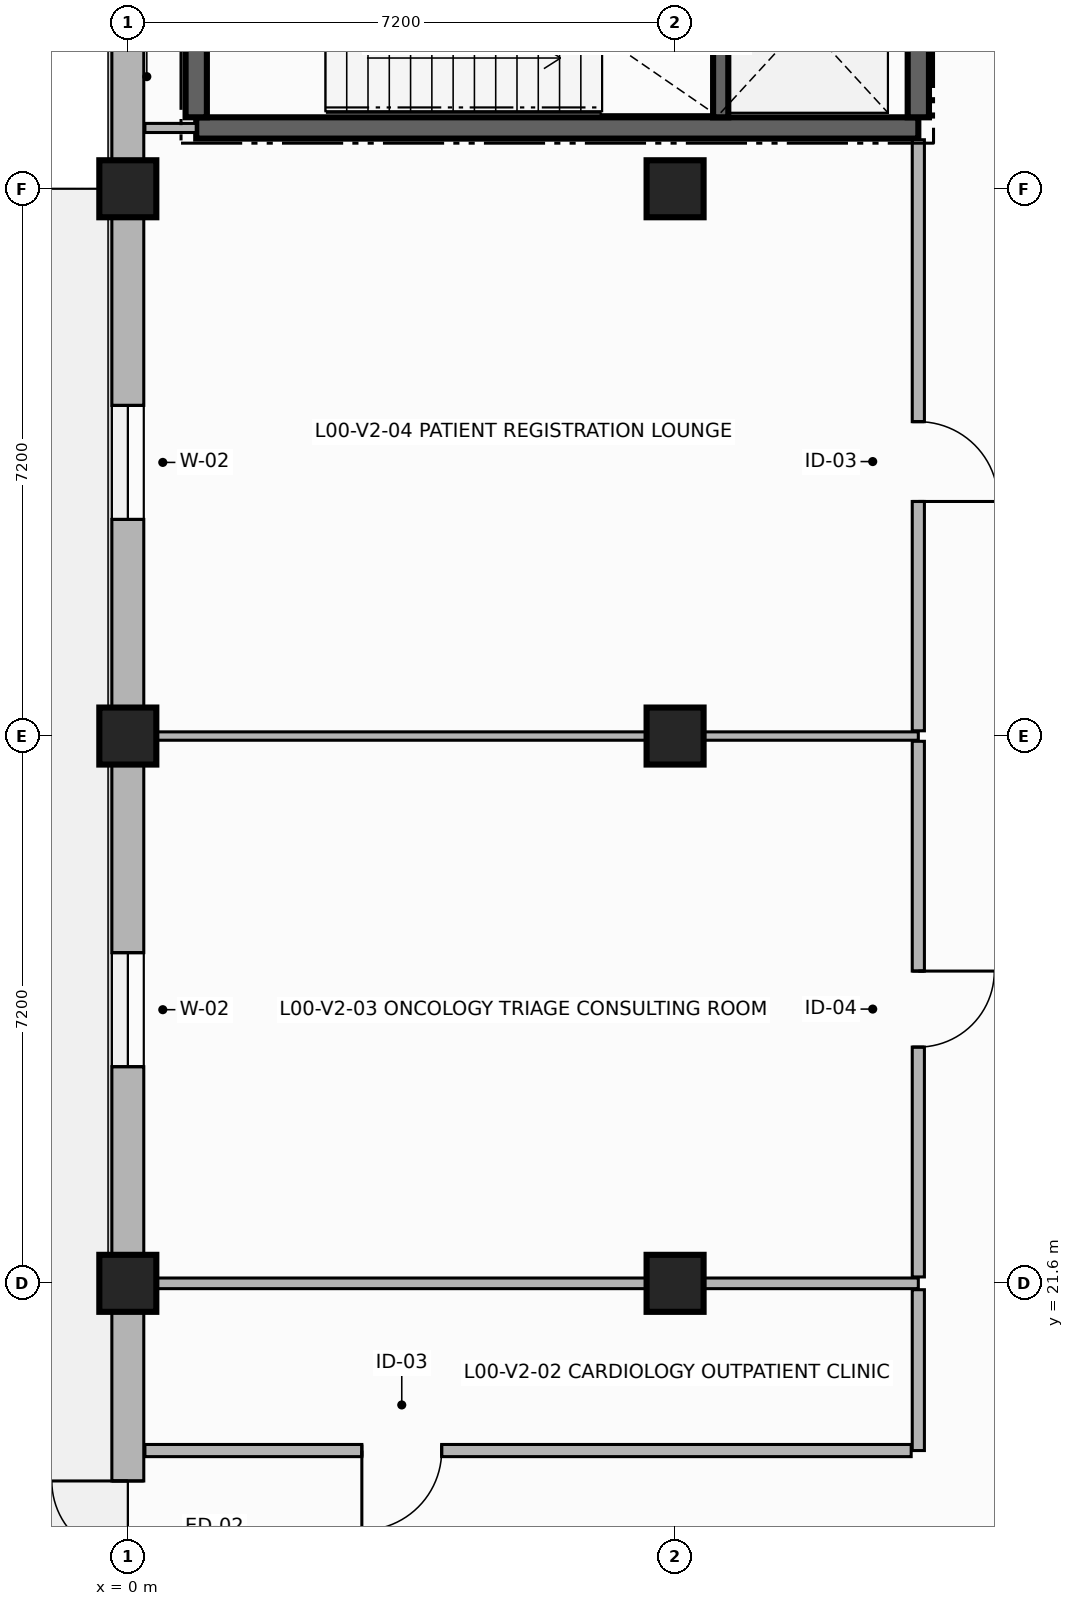
"""IFC4 building model, lengths in metres.
Left out: names, types, materials, properties, quantities, classifications, styles, units other than length and angle.
Written with IfcOpenShell. Run it as: python <this file> out.ifc"""

import sys

from ifc_helpers import new_model, si_unit, direction, frame, frame_2d, origin, origin_2d, place, context, subcontext, project, spatial, rectangle, extrude, element, fill, save


model = new_model("IFC4")
c1 = context("Model", 3, precision=1e-05, world=origin(), true_north=direction((0.0, 1.0)))
c2 = subcontext(c1, "Body", "Model", "MODEL_VIEW")
j1 = project(units=[si_unit("LENGTHUNIT", "METRE"), si_unit("PLANEANGLEUNIT", "RADIAN")], contexts=[c1])
p1 = place(None, origin())
s1 = spatial("IfcSite", under=j1, at=p1, CompositionType="ELEMENT")
p2 = place(p1, origin())
s2 = spatial("IfcBuilding", under=s1, at=p2, CompositionType="ELEMENT")
p3 = place(p2, origin())
s3 = spatial("IfcBuildingStorey", under=s2, at=p3, CompositionType="ELEMENT", Elevation=0.0)
for number, where, z_axis, x_axis in (
    (1, (0.0, 21.6, 0.0), (0.0, 0.0, 1.0), (1.0, 0.0, 0.0)),
    (2, (0.0, 28.8, 0.0), (0.0, 0.0, 1.0), (1.0, 0.0, 0.0)),
    (3, (0.0, 36.0, 0.0), (0.0, 0.0, 1.0), (1.0, 0.0, 0.0)),
    (4, (7.2, 21.6, 0.0), (0.0, 0.0, 1.0), (1.0, 0.0, 0.0)),
    (5, (7.2, 28.8, 0.0), (0.0, 0.0, 1.0), (1.0, 0.0, 0.0)),
    (6, (7.2, 36.0, 0.0), (0.0, 0.0, 1.0), (1.0, 0.0, 0.0)),
):
    element("IfcColumn", number, at=place(p3, frame(where, z_axis=z_axis, x_axis=x_axis)), inside=s3, PredefinedType="COLUMN", context=c2, shape_type="SweptSolid", body=[
        extrude(rectangle(XDim=0.75, YDim=0.75, at=origin_2d()), origin(), (0.0, 0.0, 1.0), 4.22),
    ])
p4 = place(p3, frame((0.0, 43.2, 0.0), z_axis=(0.0, 0.0, 1.0), x_axis=(0.0, -1.0, 0.0)))
e7 = element("IfcWall", 7, at=p4, inside=s3, PredefinedType="SOLIDWALL", context=c2, shape_type="SweptSolid", body=[
    extrude(rectangle(XDim=7.2, YDim=0.42, at=frame_2d((3.6, 0.0))), origin(), (0.0, 0.0, 1.0), 3.6),
])
p5 = place(p4, frame((2.75, 0.0, 0.85)))
e8 = element("IfcOpeningElement", 8, at=p5, cuts=e7, PredefinedType="OPENING", context=c2, shape_type="SweptSolid", body=[
    extrude(rectangle(XDim=1.5, YDim=2.5, at=frame_2d((0.75, 1.25))), frame((0.0, 0.22, 0.0), z_axis=(0.0, -1.0, 0.0), x_axis=(1.0, 0.0, 0.0)), (0.0, 0.0, 1.0), 0.44),
])
p6 = place(p3, frame((0.0, 36.0, 0.0), z_axis=(0.0, 0.0, 1.0), x_axis=(0.0, -1.0, 0.0)))
e9 = element("IfcWall", 9, at=p6, inside=s3, PredefinedType="SOLIDWALL", context=c2, shape_type="SweptSolid", body=[
    extrude(rectangle(XDim=7.2, YDim=0.42, at=frame_2d((3.6, 0.0))), origin(), (0.0, 0.0, 1.0), 3.6),
])
p7 = place(p6, frame((2.85, 0.0, 0.85)))
e10 = element("IfcOpeningElement", 10, at=p7, cuts=e9, PredefinedType="OPENING", context=c2, shape_type="SweptSolid", body=[
    extrude(rectangle(XDim=1.5, YDim=2.5, at=frame_2d((0.75, 1.25))), frame((0.0, 0.22, 0.0), z_axis=(0.0, -1.0, 0.0), x_axis=(1.0, 0.0, 0.0)), (0.0, 0.0, 1.0), 0.44),
])
p8 = place(p3, frame((0.0, 28.8, 0.0), z_axis=(0.0, 0.0, 1.0), x_axis=(0.0, -1.0, 0.0)))
e11 = element("IfcWall", 11, at=p8, inside=s3, PredefinedType="SOLIDWALL", context=c2, shape_type="SweptSolid", body=[
    extrude(rectangle(XDim=7.2, YDim=0.42, at=frame_2d((3.6, 0.0))), origin(), (0.0, 0.0, 1.0), 3.6),
])
p9 = place(p8, frame((2.85, 0.0, 0.85)))
e12 = element("IfcOpeningElement", 12, at=p9, cuts=e11, PredefinedType="OPENING", context=c2, shape_type="SweptSolid", body=[
    extrude(rectangle(XDim=1.5, YDim=2.5, at=frame_2d((0.75, 1.25))), frame((0.0, 0.22, 0.0), z_axis=(0.0, -1.0, 0.0), x_axis=(1.0, 0.0, 0.0)), (0.0, 0.0, 1.0), 0.44),
])
p10 = place(p3, frame((0.0, 21.6, 0.0), z_axis=(0.0, 0.0, 1.0), x_axis=(0.0, -1.0, 0.0)))
e13 = element("IfcWall", 13, at=p10, inside=s3, PredefinedType="SOLIDWALL", context=c2, shape_type="SweptSolid", body=[
    extrude(rectangle(XDim=7.2, YDim=0.42, at=frame_2d((3.6, 0.0))), origin(), (0.0, 0.0, 1.0), 3.6),
])
p11 = place(p10, frame((2.6, 0.0, 0.0)))
e14 = element("IfcOpeningElement", 14, at=p11, cuts=e13, PredefinedType="OPENING", context=c2, shape_type="SweptSolid", body=[
    extrude(rectangle(XDim=2.0, YDim=2.5, at=frame_2d((1.0, 1.25))), frame((0.0, 0.22, 0.0), z_axis=(0.0, -1.0, 0.0), x_axis=(1.0, 0.0, 0.0)), (0.0, 0.0, 1.0), 0.44),
])
p12 = place(p3, frame((0.9, 36.8, 0.0), z_axis=(0.0, 0.0, 1.0), x_axis=(1.0, 0.0, 0.0)))
e15 = element("IfcWall", 15, at=p12, inside=s3, PredefinedType="SHEAR", context=c2, shape_type="SweptSolid", body=[
    extrude(rectangle(XDim=9.5, YDim=0.28, at=frame_2d((4.75, 0.0))), origin(), (0.0, 0.0, 1.0), 4.22),
])
p13 = place(p3, frame((10.4, 36.94, 0.0), z_axis=(0.0, 0.0, 1.0), x_axis=(0.0, 1.0, 0.0)))
e16 = element("IfcWall", 16, at=p13, inside=s3, PredefinedType="SHEAR", context=c2, shape_type="SweptSolid", body=[
    extrude(rectangle(XDim=5.52, YDim=0.28, at=frame_2d((2.76, 0.0))), origin(), (0.0, 0.0, 1.0), 4.22),
])
p14 = place(p13, frame((4.0, 0.0, 0.0)))
e17 = element("IfcOpeningElement", 17, at=p14, cuts=e16, PredefinedType="OPENING", context=c2, shape_type="SweptSolid", body=[
    extrude(rectangle(XDim=1.2, YDim=2.25, at=frame_2d((0.6, 1.125))), frame((0.0, 0.15, 0.0), z_axis=(0.0, -1.0, 0.0), x_axis=(1.0, 0.0, 0.0)), (0.0, 0.0, 1.0), 0.3),
])
p15 = place(p3, frame((0.9, 42.46, 0.0), z_axis=(0.0, 0.0, 1.0), x_axis=(0.0, -1.0, 0.0)))
e18 = element("IfcWall", 18, at=p15, inside=s3, PredefinedType="SHEAR", context=c2, shape_type="SweptSolid", body=[
    extrude(rectangle(XDim=5.52, YDim=0.28, at=frame_2d((2.76, 0.0))), origin(), (0.0, 0.0, 1.0), 4.22),
])
p16 = place(p3, frame((7.8, 36.94, 0.0), z_axis=(0.0, 0.0, 1.0), x_axis=(0.0, 1.0, 0.0)))
e19 = element("IfcWall", 19, at=p16, inside=s3, PredefinedType="SHEAR", context=c2, shape_type="SweptSolid", body=[
    extrude(rectangle(XDim=3.66, YDim=0.2, at=frame_2d((1.83, 0.0))), origin(), (0.0, 0.0, 1.0), 4.22),
])
p17 = place(p3, frame((0.225, 21.6, 0.0), z_axis=(0.0, 0.0, 1.0), x_axis=(1.0, 0.0, 0.0)))
e20 = element("IfcWall", 20, at=p17, inside=s3, PredefinedType="PARTITIONING", context=c2, shape_type="SweptSolid", body=[
    extrude(rectangle(XDim=10.175, YDim=0.14, at=frame_2d((5.087, 0.0))), origin(), (0.0, 0.0, 1.0), 3.58),
])
p18 = place(p3, frame((10.4, 21.516, 0.0), z_axis=(0.0, 0.0, 1.0), x_axis=(0.0, -1.0, 0.0)))
e21 = element("IfcWall", 21, at=p18, inside=s3, PredefinedType="PARTITIONING", context=c2, shape_type="SweptSolid", body=[
    extrude(rectangle(XDim=2.116, YDim=0.16, at=frame_2d((1.058, 0.0))), origin(), (0.0, 0.0, 1.0), 3.58),
])
p19 = place(p3, frame((10.306, 19.4, 0.0), z_axis=(0.0, 0.0, 1.0), x_axis=(-1.0, 0.0, 0.0)))
e22 = element("IfcWall", 22, at=p19, inside=s3, PredefinedType="PARTITIONING", context=c2, shape_type="SweptSolid", body=[
    extrude(rectangle(XDim=10.081, YDim=0.16, at=frame_2d((5.041, 0.0))), origin(), (0.0, 0.0, 1.0), 3.58),
])
p20 = place(p19, frame((6.177, 0.0, 0.0)))
e23 = element("IfcOpeningElement", 23, at=p20, cuts=e22, PredefinedType="OPENING", context=c2, shape_type="SweptSolid", body=[
    extrude(rectangle(XDim=1.05, YDim=2.15, at=frame_2d((0.525, 1.075))), frame((0.0, 0.09, 0.0), z_axis=(0.0, -1.0, 0.0), x_axis=(1.0, 0.0, 0.0)), (0.0, 0.0, 1.0), 0.18),
])
p21 = place(p3, frame((0.225, 28.8, 0.0), z_axis=(0.0, 0.0, 1.0), x_axis=(1.0, 0.0, 0.0)))
e24 = element("IfcWall", 24, at=p21, inside=s3, PredefinedType="PARTITIONING", context=c2, shape_type="SweptSolid", body=[
    extrude(rectangle(XDim=10.175, YDim=0.11, at=frame_2d((5.087, 0.0))), origin(), (0.0, 0.0, 1.0), 3.58),
])
p22 = place(p3, frame((10.4, 28.731, 0.0), z_axis=(0.0, 0.0, 1.0), x_axis=(0.0, -1.0, 0.0)))
e25 = element("IfcWall", 25, at=p22, inside=s3, PredefinedType="PARTITIONING", context=c2, shape_type="SweptSolid", body=[
    extrude(rectangle(XDim=7.047, YDim=0.16, at=frame_2d((3.523, 0.0))), origin(), (0.0, 0.0, 1.0), 3.58),
])
p23 = place(p22, frame((3.023, 0.0, 0.0)))
e26 = element("IfcOpeningElement", 26, at=p23, cuts=e25, PredefinedType="OPENING", context=c2, shape_type="SweptSolid", body=[
    extrude(rectangle(XDim=1.0, YDim=2.15, at=frame_2d((0.5, 1.075))), frame((0.0, 0.09, 0.0), z_axis=(0.0, -1.0, 0.0), x_axis=(1.0, 0.0, 0.0)), (0.0, 0.0, 1.0), 0.18),
])
p24 = place(p3, frame((0.225, 36.8, 0.0), z_axis=(0.0, 0.0, 1.0), x_axis=(1.0, 0.0, 0.0)))
e27 = element("IfcWall", 27, at=p24, inside=s3, PredefinedType="PARTITIONING", context=c2, shape_type="SweptSolid", body=[
    extrude(rectangle(XDim=0.675, YDim=0.12, at=frame_2d((0.337, 0.0))), origin(), (0.0, 0.0, 1.0), 3.58),
])
p25 = place(p3, frame((10.4, 36.645, 0.0), z_axis=(0.0, 0.0, 1.0), x_axis=(0.0, -1.0, 0.0)))
e28 = element("IfcWall", 28, at=p25, inside=s3, PredefinedType="PARTITIONING", context=c2, shape_type="SweptSolid", body=[
    extrude(rectangle(XDim=7.776, YDim=0.16, at=frame_2d((3.888, 0.0))), origin(), (0.0, 0.0, 1.0), 3.58),
])
p26 = place(p25, frame((3.709, 0.0, 0.0)))
e29 = element("IfcOpeningElement", 29, at=p26, cuts=e28, PredefinedType="OPENING", context=c2, shape_type="SweptSolid", body=[
    extrude(rectangle(XDim=1.05, YDim=2.15, at=frame_2d((0.525, 1.075))), frame((0.0, 0.09, 0.0), z_axis=(0.0, -1.0, 0.0), x_axis=(1.0, 0.0, 0.0)), (0.0, 0.0, 1.0), 0.18),
])
p27 = place(p7, origin())
e30 = element("IfcWindow", 30, at=p27, inside=s3, PartitioningType="SINGLE_PANEL", PredefinedType="WINDOW", context=c2, shape_type="SweptSolid", body=[
    extrude(rectangle(XDim=1.5, YDim=2.5, at=frame_2d((0.75, 1.25))), frame((0.0, 0.03, 0.0), z_axis=(0.0, -1.0, 0.0), x_axis=(1.0, 0.0, 0.0)), (0.0, 0.0, 1.0), 0.06),
])
fill(e10, e30)
p28 = place(p9, origin())
e31 = element("IfcWindow", 31, at=p28, inside=s3, PartitioningType="SINGLE_PANEL", PredefinedType="WINDOW", context=c2, shape_type="SweptSolid", body=[
    extrude(rectangle(XDim=1.5, YDim=2.5, at=frame_2d((0.75, 1.25))), frame((0.0, 0.03, 0.0), z_axis=(0.0, -1.0, 0.0), x_axis=(1.0, 0.0, 0.0)), (0.0, 0.0, 1.0), 0.06),
])
fill(e12, e31)
p29 = place(p11, frame((2.0, 0.0, 0.0), z_axis=(0.0, 0.0, 1.0), x_axis=(-1.0, 0.0, 0.0)))
e32 = element("IfcDoor", 32, at=p29, inside=s3, OperationType="DOUBLE_DOOR_SINGLE_SWING", PredefinedType="DOOR", context=c2, shape_type="SweptSolid", body=[
    extrude(rectangle(XDim=2.0, YDim=2.5, at=frame_2d((1.0, 1.25))), frame((0.0, 0.025, 0.0), z_axis=(0.0, -1.0, 0.0), x_axis=(1.0, 0.0, 0.0)), (0.0, 0.0, 1.0), 0.05),
])
fill(e14, e32)
p30 = place(p20, origin())
e33 = element("IfcDoor", 33, at=p30, inside=s3, OperationType="SINGLE_SWING_RIGHT", PredefinedType="DOOR", context=c2, shape_type="SweptSolid", body=[
    extrude(rectangle(XDim=1.05, YDim=2.15, at=frame_2d((0.525, 1.075))), frame((0.0, 0.025, 0.0), z_axis=(0.0, -1.0, 0.0), x_axis=(1.0, 0.0, 0.0)), (0.0, 0.0, 1.0), 0.05),
])
fill(e23, e33)
p31 = place(p23, origin())
e34 = element("IfcDoor", 34, at=p31, inside=s3, OperationType="SINGLE_SWING_LEFT", PredefinedType="DOOR", context=c2, shape_type="SweptSolid", body=[
    extrude(rectangle(XDim=1.0, YDim=2.15, at=frame_2d((0.5, 1.075))), frame((0.0, 0.025, 0.0), z_axis=(0.0, -1.0, 0.0), x_axis=(1.0, 0.0, 0.0)), (0.0, 0.0, 1.0), 0.05),
])
fill(e26, e34)
p32 = place(p26, origin())
e35 = element("IfcDoor", 35, at=p32, inside=s3, OperationType="SINGLE_SWING_RIGHT", PredefinedType="DOOR", context=c2, shape_type="SweptSolid", body=[
    extrude(rectangle(XDim=1.05, YDim=2.15, at=frame_2d((0.525, 1.075))), frame((0.0, 0.025, 0.0), z_axis=(0.0, -1.0, 0.0), x_axis=(1.0, 0.0, 0.0)), (0.0, 0.0, 1.0), 0.05),
])
fill(e29, e35)
save(model, sys.argv[1])
